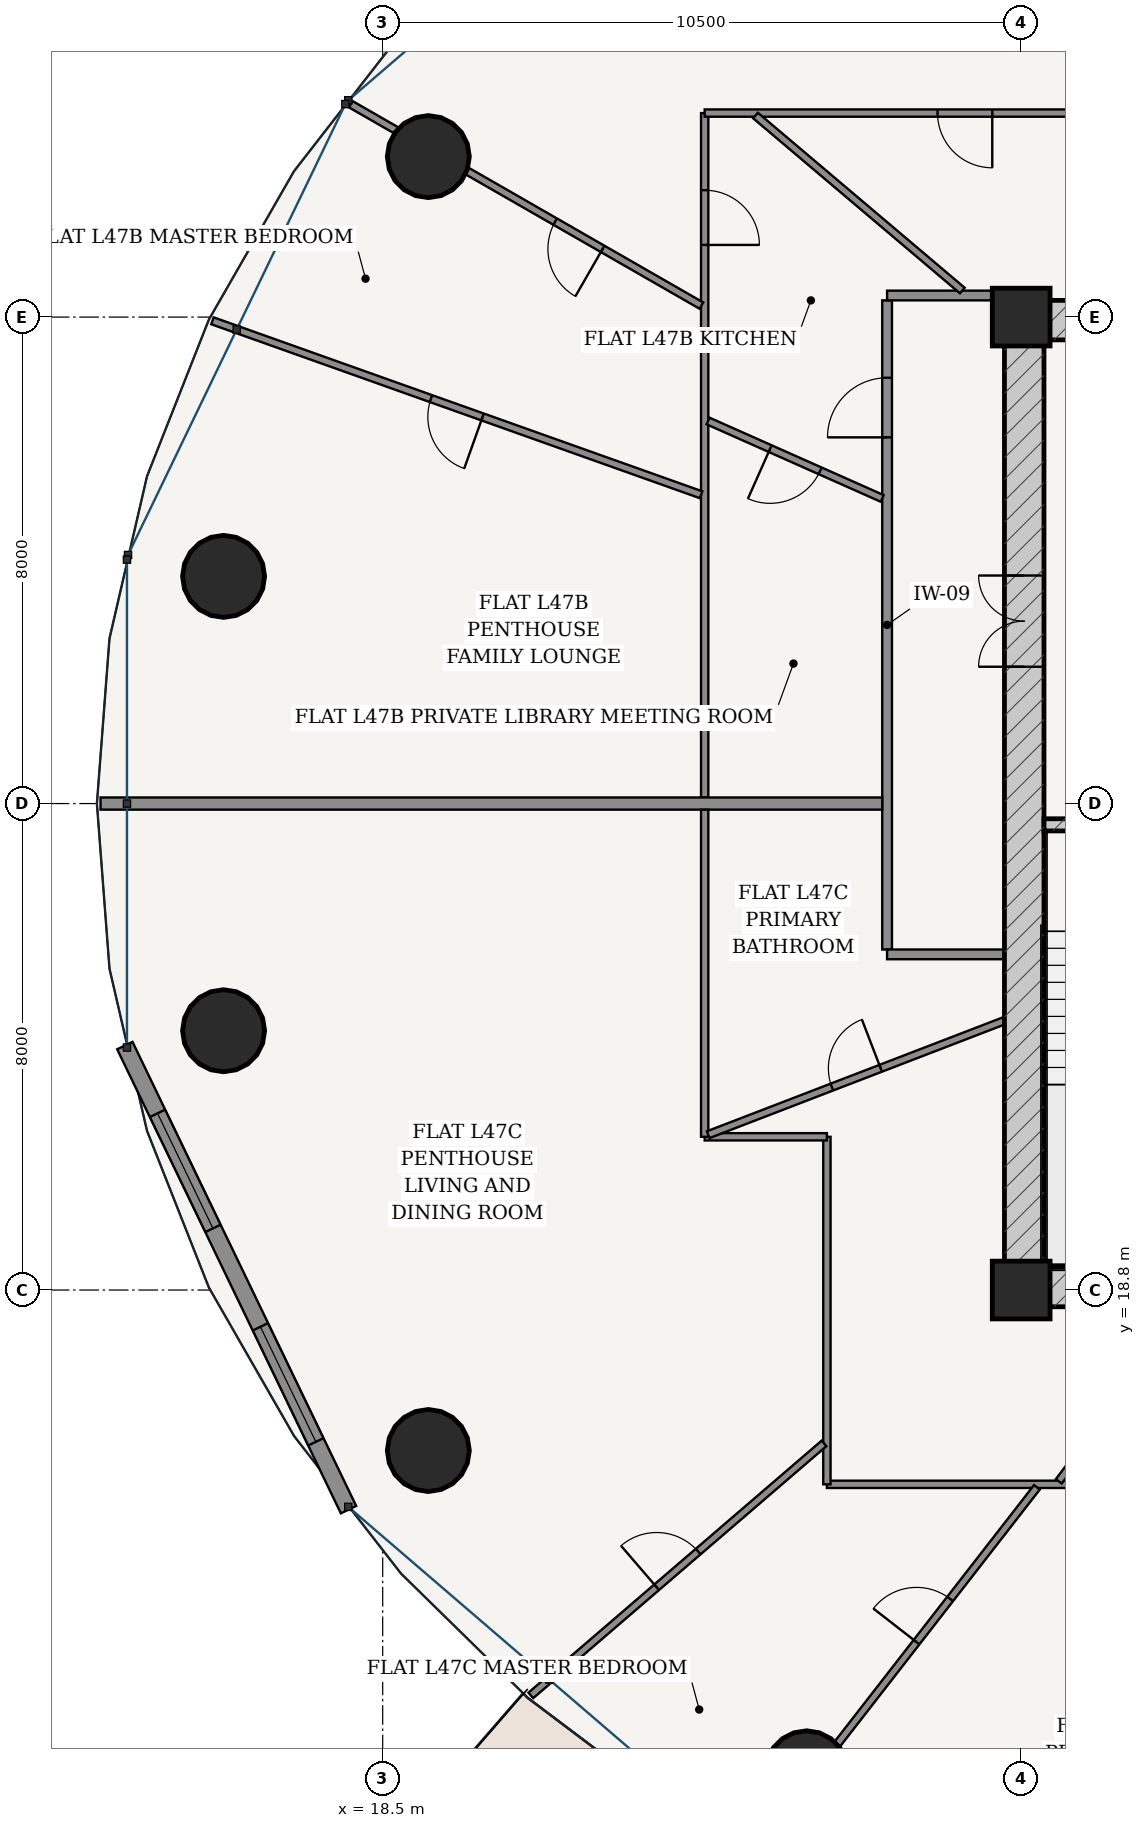
"""IFC4 building model, lengths in metres.
Left out: names, types, materials, properties, quantities, classifications, styles, units other than length and angle.
Written with IfcOpenShell. Run it as: python <this file> out.ifc"""

import sys

from ifc_helpers import new_model, si_unit, direction, frame, frame_2d, origin, origin_2d, place, context, subcontext, project, spatial, rectangle, hollow_circle, extrude, source, transform, mapped, element, fill, save


model = new_model("IFC4")
c1 = context("Model", 3, precision=1e-05, world=origin(), true_north=direction((-0.2419218956, 0.970295726276)))
c2 = subcontext(c1, "Body", "Model", "MODEL_VIEW")
j1 = project(units=[si_unit("LENGTHUNIT", "METRE"), si_unit("PLANEANGLEUNIT", "RADIAN")], contexts=[c1])
p1 = place(None, origin())
s1 = spatial("IfcSite", under=j1, at=p1, CompositionType="ELEMENT")
p2 = place(p1, origin())
s2 = spatial("IfcBuilding", under=s1, at=p2, CompositionType="ELEMENT")
p3 = place(p2, frame((0.0, 0.0, 178.6)))
s3 = spatial("IfcBuildingStorey", under=s2, at=p3, CompositionType="ELEMENT", Elevation=178.6)
for number, where, z_axis, x_axis in (
    (1, (29.0, 18.8, 0.0), (0.0, 0.0, 1.0), (1.0, 0.0, 0.0)),
    (2, (29.0, 34.8, 0.0), (0.0, 0.0, 1.0), (1.0, 0.0, 0.0)),
):
    element("IfcColumn", number, at=place(p3, frame(where, z_axis=z_axis, x_axis=x_axis)), inside=s3, PredefinedType="COLUMN", context=c2, shape_type="SweptSolid", body=[
        extrude(rectangle(XDim=0.95, YDim=0.95, at=origin_2d()), origin(), (0.0, 0.0, 1.0), 3.6),
    ])
p4 = place(p3, frame((28.725, 18.85, 0.0), z_axis=(0.0, 0.0, 1.0), x_axis=(1.0, 0.0, 0.0)))
e3 = element("IfcWall", 3, at=p4, inside=s3, PredefinedType="SHEAR", context=c2, shape_type="SweptSolid", body=[
    extrude(rectangle(XDim=18.55, YDim=0.65, at=frame_2d((9.275, 0.0))), origin(), (0.0, 0.0, 1.0), 3.33),
])
p5 = place(p4, frame((7.51, 0.0, 0.0)))
e4 = element("IfcOpeningElement", 4, at=p5, cuts=e3, PredefinedType="OPENING", context=c2, shape_type="SweptSolid", body=[
    extrude(rectangle(XDim=0.85, YDim=2.1, at=frame_2d((0.425, 1.05))), frame((0.0, 0.335, 0.0), z_axis=(0.0, -1.0, 0.0), x_axis=(1.0, 0.0, 0.0)), (0.0, 0.0, 1.0), 0.67),
])
p6 = place(p4, frame((10.59, 0.0, 0.0)))
e5 = element("IfcOpeningElement", 5, at=p6, cuts=e3, PredefinedType="OPENING", context=c2, shape_type="SweptSolid", body=[
    extrude(rectangle(XDim=0.85, YDim=2.1, at=frame_2d((0.425, 1.05))), frame((0.0, 0.335, 0.0), z_axis=(0.0, -1.0, 0.0), x_axis=(1.0, 0.0, 0.0)), (0.0, 0.0, 1.0), 0.67),
])
p7 = place(p3, frame((28.725, 34.75, 0.0), z_axis=(0.0, 0.0, 1.0), x_axis=(1.0, 0.0, 0.0)))
e6 = element("IfcWall", 6, at=p7, inside=s3, PredefinedType="SHEAR", context=c2, shape_type="SweptSolid", body=[
    extrude(rectangle(XDim=18.55, YDim=0.65, at=frame_2d((9.275, 0.0))), origin(), (0.0, 0.0, 1.0), 3.33),
])
p8 = place(p3, frame((29.05, 19.175, 0.0), z_axis=(0.0, 0.0, 1.0), x_axis=(0.0, 1.0, 0.0)))
e7 = element("IfcWall", 7, at=p8, inside=s3, PredefinedType="SHEAR", context=c2, shape_type="SweptSolid", body=[
    extrude(rectangle(XDim=15.25, YDim=0.65, at=frame_2d((7.625, 0.0))), origin(), (0.0, 0.0, 1.0), 3.33),
])
p9 = place(p8, frame((9.875, 0.0, 0.0)))
e8 = element("IfcOpeningElement", 8, at=p9, cuts=e7, PredefinedType="OPENING", context=c2, shape_type="SweptSolid", body=[
    extrude(rectangle(XDim=1.5, YDim=2.2, at=frame_2d((0.75, 1.1))), frame((0.0, 0.335, 0.0), z_axis=(0.0, -1.0, 0.0), x_axis=(1.0, 0.0, 0.0)), (0.0, 0.0, 1.0), 0.67),
])
p10 = place(p3, frame((29.375, 26.45, 0.0), z_axis=(0.0, 0.0, 1.0), x_axis=(1.0, 0.0, 0.0)))
e9 = element("IfcWall", 9, at=p10, inside=s3, PredefinedType="SOLIDWALL", context=c2, shape_type="SweptSolid", body=[
    extrude(rectangle(XDim=3.32, YDim=0.2, at=frame_2d((1.66, 0.0))), origin(), (0.0, 0.0, 1.0), 3.33),
])
p11 = place(p10, frame((1.185, 0.0, 0.0)))
e10 = element("IfcOpeningElement", 10, at=p11, cuts=e9, PredefinedType="OPENING", context=c2, shape_type="SweptSolid", body=[
    extrude(rectangle(XDim=0.95, YDim=2.15, at=frame_2d((0.475, 1.075))), frame((0.0, 0.11, 0.0), z_axis=(0.0, -1.0, 0.0), x_axis=(1.0, 0.0, 0.0)), (0.0, 0.0, 1.0), 0.22),
])
for number, where, z_axis, x_axis in (
    (11, (19.25, 37.439, 0.0), (0.0, 0.0, 1.0), (1.0, 0.0, 0.0)),
    (12, (15.883, 30.536, 0.0), (0.0, 0.0, 1.0), (1.0, 0.0, 0.0)),
    (13, (15.883, 23.064, 0.0), (0.0, 0.0, 1.0), (1.0, 0.0, 0.0)),
    (14, (19.25, 16.161, 0.0), (0.0, 0.0, 1.0), (1.0, 0.0, 0.0)),
    (15, (25.472, 10.877, 0.0), (0.0, 0.0, 1.0), (1.0, 0.0, 0.0)),
):
    element("IfcColumn", number, at=place(p3, frame(where, z_axis=z_axis, x_axis=x_axis)), inside=s3, PredefinedType="COLUMN", context=c2, shape_type="SweptSolid", body=[
        extrude(hollow_circle(Radius=0.675, WallThickness=0.042, at=origin_2d()), origin(), (0.0, 0.0, 1.0), 3.6),
    ])
p12 = place(p3, frame((14.26, 22.82, 0.0), z_axis=(0.0, 0.0, 1.0), x_axis=(0.434209827226, -0.900811759437, 0.0)))
e16 = element("IfcWall", 16, at=p12, inside=s3, PredefinedType="SOLIDWALL", context=c2, shape_type="SweptSolid", body=[
    extrude(rectangle(XDim=8.472, YDim=0.28, at=frame_2d((4.236, 0.0))), origin(), (0.0, 0.0, 1.0), 3.33),
])
p13 = place(p12, frame((1.237, 0.0, 0.85)))
e17 = element("IfcOpeningElement", 17, at=p13, cuts=e16, PredefinedType="OPENING", context=c2, shape_type="SweptSolid", body=[
    extrude(rectangle(XDim=2.1, YDim=1.95, at=frame_2d((1.05, 0.975))), frame((0.0, 0.15, 0.0), z_axis=(0.0, -1.0, 0.0), x_axis=(1.0, 0.0, 0.0)), (0.0, 0.0, 1.0), 0.3),
])
p14 = place(p12, frame((5.134, 0.0, 0.85)))
e18 = element("IfcOpeningElement", 18, at=p14, cuts=e16, PredefinedType="OPENING", context=c2, shape_type="SweptSolid", body=[
    extrude(rectangle(XDim=2.1, YDim=1.95, at=frame_2d((1.05, 0.975))), frame((0.0, 0.15, 0.0), z_axis=(0.0, -1.0, 0.0), x_axis=(1.0, 0.0, 0.0)), (0.0, 0.0, 1.0), 0.3),
])
p15 = place(p3, frame((26.795, 24.4, 0.0), z_axis=(0.0, 0.0, 1.0), x_axis=(0.0, 1.0, 0.0)))
e19 = element("IfcWall", 19, at=p15, inside=s3, PredefinedType="PARTITIONING", context=c2, shape_type="SweptSolid", body=[
    extrude(rectangle(XDim=10.675, YDim=0.16, at=frame_2d((5.337, 0.0))), origin(), (0.0, 0.0, 1.0), 2.776),
])
p16 = place(p15, frame((8.422, 0.0, 0.0)))
e20 = element("IfcOpeningElement", 20, at=p16, cuts=e19, PredefinedType="OPENING", context=c2, shape_type="SweptSolid", body=[
    extrude(rectangle(XDim=0.98, YDim=2.2, at=frame_2d((0.49, 1.1))), frame((0.0, 0.09, 0.0), z_axis=(0.0, -1.0, 0.0), x_axis=(1.0, 0.0, 0.0)), (0.0, 0.0, 1.0), 0.18),
])
p17 = place(p3, frame((26.795, 35.155, 0.0), z_axis=(0.0, 0.0, 1.0), x_axis=(1.0, 0.0, 0.0)))
e21 = element("IfcWall", 21, at=p17, inside=s3, PredefinedType="PARTITIONING", context=c2, shape_type="SweptSolid", body=[
    extrude(rectangle(XDim=1.93, YDim=0.16, at=frame_2d((0.965, 0.0))), origin(), (0.0, 0.0, 1.0), 2.776),
])
p18 = place(p3, frame((26.795, 24.32, 0.0), z_axis=(0.0, 0.0, 1.0), x_axis=(1.0, 0.0, 0.0)))
e22 = element("IfcWall", 22, at=p18, inside=s3, PredefinedType="PARTITIONING", context=c2, shape_type="SweptSolid", body=[
    extrude(rectangle(XDim=1.93, YDim=0.16, at=frame_2d((0.965, 0.0))), origin(), (0.0, 0.0, 1.0), 3.33),
])
p19 = place(p3, frame((23.795, 26.902, 0.0), z_axis=(0.0, 0.0, 1.0), x_axis=(0.0, 1.0, 0.0)))
e23 = element("IfcWall", 23, at=p19, inside=s3, PredefinedType="PARTITIONING", context=c2, shape_type="SweptSolid", body=[
    extrude(rectangle(XDim=11.253, YDim=0.12, at=frame_2d((5.626, 0.0))), origin(), (0.0, 0.0, 1.0), 2.776),
])
p20 = place(p19, frame((9.085, 0.0, 0.0)))
e24 = element("IfcOpeningElement", 24, at=p20, cuts=e23, PredefinedType="OPENING", context=c2, shape_type="SweptSolid", body=[
    extrude(rectangle(XDim=0.9, YDim=2.15, at=frame_2d((0.45, 1.075))), frame((0.0, 0.07, 0.0), z_axis=(0.0, -1.0, 0.0), x_axis=(1.0, 0.0, 0.0)), (0.0, 0.0, 1.0), 0.14),
])
p21 = place(p3, frame((23.795, 38.155, 0.0), z_axis=(0.0, 0.0, 1.0), x_axis=(1.0, 0.0, 0.0)))
e25 = element("IfcWall", 25, at=p21, inside=s3, PredefinedType="PARTITIONING", context=c2, shape_type="SweptSolid", body=[
    extrude(rectangle(XDim=8.01, YDim=0.12, at=frame_2d((4.005, 0.0))), origin(), (0.0, 0.0, 1.0), 2.776),
])
p22 = place(p21, frame((3.83, 0.0, 0.0)))
e26 = element("IfcOpeningElement", 26, at=p22, cuts=e25, PredefinedType="OPENING", context=c2, shape_type="SweptSolid", body=[
    extrude(rectangle(XDim=0.9, YDim=2.15, at=frame_2d((0.45, 1.075))), frame((0.0, 0.07, 0.0), z_axis=(0.0, -1.0, 0.0), x_axis=(1.0, 0.0, 0.0)), (0.0, 0.0, 1.0), 0.14),
])
p23 = place(p3, frame((23.741, 34.989, 0.0), z_axis=(0.0, 0.0, 1.0), x_axis=(-0.867167953258, 0.498015803808, 0.0)))
e27 = element("IfcWall", 27, at=p23, inside=s3, PredefinedType="PARTITIONING", context=c2, shape_type="SweptSolid", body=[
    extrude(rectangle(XDim=6.65, YDim=0.12, at=frame_2d((3.325, 0.0))), origin(), (0.0, 0.0, 1.0), 2.776),
])
p24 = place(p23, frame((1.873, 0.0, 0.0)))
e28 = element("IfcOpeningElement", 28, at=p24, cuts=e27, PredefinedType="OPENING", context=c2, shape_type="SweptSolid", body=[
    extrude(rectangle(XDim=0.9, YDim=2.15, at=frame_2d((0.45, 1.075))), frame((0.0, 0.07, 0.0), z_axis=(0.0, -1.0, 0.0), x_axis=(1.0, 0.0, 0.0)), (0.0, 0.0, 1.0), 0.14),
])
p25 = place(p3, frame((23.737, 31.878, 0.0), z_axis=(0.0, 0.0, 1.0), x_axis=(-0.942071057968, 0.335413359512, 0.0)))
e29 = element("IfcWall", 29, at=p25, inside=s3, PredefinedType="PARTITIONING", context=c2, shape_type="SweptSolid", body=[
    extrude(rectangle(XDim=8.53, YDim=0.12, at=frame_2d((4.265, 0.0))), origin(), (0.0, 0.0, 1.0), 2.846),
])
p26 = place(p25, frame((3.815, 0.0, 0.0)))
e30 = element("IfcOpeningElement", 30, at=p26, cuts=e29, PredefinedType="OPENING", context=c2, shape_type="SweptSolid", body=[
    extrude(rectangle(XDim=0.9, YDim=2.15, at=frame_2d((0.45, 1.075))), frame((0.0, 0.07, 0.0), z_axis=(0.0, -1.0, 0.0), x_axis=(1.0, 0.0, 0.0)), (0.0, 0.0, 1.0), 0.14),
])
p27 = place(p3, frame((28.032, 35.236, 0.0), z_axis=(0.0, 0.0, 1.0), x_axis=(-0.763321857138, 0.646018376221, 0.0)))
e31 = element("IfcWall", 31, at=p27, inside=s3, PredefinedType="PARTITIONING", context=c2, shape_type="SweptSolid", body=[
    extrude(rectangle(XDim=4.456, YDim=0.12, at=frame_2d((2.228, 0.0))), origin(), (0.0, 0.0, 1.0), 3.005),
])
p28 = place(p3, frame((26.715, 31.818, 0.0), z_axis=(0.0, 0.0, 1.0), x_axis=(-0.913750499147, 0.406275799561, 0.0)))
e32 = element("IfcWall", 32, at=p28, inside=s3, PredefinedType="PARTITIONING", context=c2, shape_type="SweptSolid", body=[
    extrude(rectangle(XDim=3.134, YDim=0.12, at=frame_2d((1.567, 0.0))), origin(), (0.0, 0.0, 1.0), 3.33),
])
p29 = place(p28, frame((1.117, 0.0, 0.0)))
e33 = element("IfcOpeningElement", 33, at=p29, cuts=e32, PredefinedType="OPENING", context=c2, shape_type="SweptSolid", body=[
    extrude(rectangle(XDim=0.9, YDim=2.15, at=frame_2d((0.45, 1.075))), frame((0.0, 0.07, 0.0), z_axis=(0.0, -1.0, 0.0), x_axis=(1.0, 0.0, 0.0)), (0.0, 0.0, 1.0), 0.14),
])
p30 = place(p3, frame((26.715, 26.8, 0.0), z_axis=(0.0, 0.0, 1.0), x_axis=(-1.0, 0.0, 0.0)))
e34 = element("IfcWall", 34, at=p30, inside=s3, PredefinedType="PARTITIONING", context=c2, shape_type="SweptSolid", body=[
    extrude(rectangle(XDim=12.855, YDim=0.2, at=frame_2d((6.427, 0.0))), origin(), (0.0, 0.0, 1.0), 2.846),
])
p31 = place(p3, frame((31.32, 15.605, 0.0), z_axis=(0.0, 0.0, 1.0), x_axis=(-1.0, 0.0, 0.0)))
e35 = element("IfcWall", 35, at=p31, inside=s3, PredefinedType="PARTITIONING", context=c2, shape_type="SweptSolid", body=[
    extrude(rectangle(XDim=5.515, YDim=0.12, at=frame_2d((2.758, 0.0))), origin(), (0.0, 0.0, 1.0), 2.776),
])
p32 = place(p3, frame((25.805, 15.605, 0.0), z_axis=(0.0, 0.0, 1.0), x_axis=(0.0, 1.0, 0.0)))
e36 = element("IfcWall", 36, at=p32, inside=s3, PredefinedType="PARTITIONING", context=c2, shape_type="SweptSolid", body=[
    extrude(rectangle(XDim=5.715, YDim=0.12, at=frame_2d((2.857, 0.0))), origin(), (0.0, 0.0, 1.0), 2.776),
])
p33 = place(p3, frame((25.805, 21.32, 0.0), z_axis=(0.0, 0.0, 1.0), x_axis=(-1.0, 0.0, 0.0)))
e37 = element("IfcWall", 37, at=p33, inside=s3, PredefinedType="PARTITIONING", context=c2, shape_type="SweptSolid", body=[
    extrude(rectangle(XDim=2.01, YDim=0.12, at=frame_2d((1.005, 0.0))), origin(), (0.0, 0.0, 1.0), 3.33),
])
p34 = place(p3, frame((23.795, 21.32, 0.0), z_axis=(0.0, 0.0, 1.0), x_axis=(0.0, 1.0, 0.0)))
e38 = element("IfcWall", 38, at=p34, inside=s3, PredefinedType="PARTITIONING", context=c2, shape_type="SweptSolid", body=[
    extrude(rectangle(XDim=5.378, YDim=0.12, at=frame_2d((2.689, 0.0))), origin(), (0.0, 0.0, 1.0), 2.776),
])
p35 = place(p3, frame((25.758, 16.278, 0.0), z_axis=(0.0, 0.0, 1.0), x_axis=(-0.758374994665, -0.651818508073, 0.0)))
e39 = element("IfcWall", 39, at=p35, inside=s3, PredefinedType="PARTITIONING", context=c2, shape_type="SweptSolid", body=[
    extrude(rectangle(XDim=6.358, YDim=0.12, at=frame_2d((3.179, 0.0))), origin(), (0.0, 0.0, 1.0), 2.846),
])
p36 = place(p35, frame((2.729, 0.0, 0.0)))
e40 = element("IfcOpeningElement", 40, at=p36, cuts=e39, PredefinedType="OPENING", context=c2, shape_type="SweptSolid", body=[
    extrude(rectangle(XDim=0.9, YDim=2.15, at=frame_2d((0.45, 1.075))), frame((0.0, 0.07, 0.0), z_axis=(0.0, -1.0, 0.0), x_axis=(1.0, 0.0, 0.0)), (0.0, 0.0, 1.0), 0.14),
])
p37 = place(p3, frame((29.259, 15.556, 0.0), z_axis=(0.0, 0.0, 1.0), x_axis=(-0.61375493029, -0.789496602617, 0.0)))
e41 = element("IfcWall", 41, at=p37, inside=s3, PredefinedType="PARTITIONING", context=c2, shape_type="SweptSolid", body=[
    extrude(rectangle(XDim=7.556, YDim=0.12, at=frame_2d((3.778, 0.0))), origin(), (0.0, 0.0, 1.0), 2.776),
])
p38 = place(p37, frame((2.325, 0.0, 0.0)))
e42 = element("IfcOpeningElement", 42, at=p38, cuts=e41, PredefinedType="OPENING", context=c2, shape_type="SweptSolid", body=[
    extrude(rectangle(XDim=0.9, YDim=2.15, at=frame_2d((0.45, 1.075))), frame((0.0, 0.07, 0.0), z_axis=(0.0, -1.0, 0.0), x_axis=(1.0, 0.0, 0.0)), (0.0, 0.0, 1.0), 0.14),
])
p39 = place(p3, frame((28.723, 23.229, 0.0), z_axis=(0.0, 0.0, 1.0), x_axis=(-0.933262385607, -0.359195378048, 0.0)))
e43 = element("IfcWall", 43, at=p39, inside=s3, PredefinedType="PARTITIONING", context=c2, shape_type="SweptSolid", body=[
    extrude(rectangle(XDim=5.219, YDim=0.12, at=frame_2d((2.609, 0.0))), origin(), (0.0, 0.0, 1.0), 3.33),
])
p40 = place(p39, frame((2.179, 0.0, 0.0)))
e44 = element("IfcOpeningElement", 44, at=p40, cuts=e43, PredefinedType="OPENING", context=c2, shape_type="SweptSolid", body=[
    extrude(rectangle(XDim=0.86, YDim=2.15, at=frame_2d((0.43, 1.075))), frame((0.0, 0.07, 0.0), z_axis=(0.0, -1.0, 0.0), x_axis=(1.0, 0.0, 0.0)), (0.0, 0.0, 1.0), 0.14),
])
p41 = place(p3, frame((31.777, 18.525, 0.0), z_axis=(0.0, 0.0, 1.0), x_axis=(-0.601054484551, -0.799208049635, 0.0)))
e45 = element("IfcWall", 45, at=p41, inside=s3, PredefinedType="PARTITIONING", context=c2, shape_type="SweptSolid", body=[
    extrude(rectangle(XDim=3.592, YDim=0.12, at=frame_2d((1.796, 0.0))), origin(), (0.0, 0.0, 1.0), 3.33),
])
p42 = place(p41, frame((1.346, 0.0, 0.0)))
e46 = element("IfcOpeningElement", 46, at=p42, cuts=e45, PredefinedType="OPENING", context=c2, shape_type="SweptSolid", body=[
    extrude(rectangle(XDim=0.9, YDim=2.15, at=frame_2d((0.45, 1.075))), frame((0.0, 0.07, 0.0), z_axis=(0.0, -1.0, 0.0), x_axis=(1.0, 0.0, 0.0)), (0.0, 0.0, 1.0), 0.14),
])
m1 = source(origin(), c2, "Body", "SweptSolid", [
    extrude(rectangle(XDim=2.1, YDim=1.95, at=frame_2d((1.05, 0.975))), frame((0.0, 0.03, 0.0), z_axis=(0.0, -1.0, 0.0), x_axis=(1.0, 0.0, 0.0)), (0.0, 0.0, 1.0), 0.06),
])
p43 = place(p13, origin())
e47 = element("IfcWindow", 47, at=p43, inside=s3, PartitioningType="SINGLE_PANEL", PredefinedType="WINDOW", context=c2, shape_type="MappedRepresentation", body=[
    mapped(m1, transform((0.0, 0.0, 0.0), scale=1.0)),
])
fill(e17, e47)
p44 = place(p14, origin())
e48 = element("IfcWindow", 48, at=p44, inside=s3, PartitioningType="SINGLE_PANEL", PredefinedType="WINDOW", context=c2, shape_type="MappedRepresentation", body=[
    mapped(m1, transform((0.0, 0.0, 0.0), scale=1.0)),
])
fill(e18, e48)
m2 = source(origin(), c2, "Body", "SweptSolid", [
    extrude(rectangle(XDim=1.5, YDim=2.2, at=frame_2d((0.75, 1.1))), frame((0.0, 0.025, 0.0), z_axis=(0.0, -1.0, 0.0), x_axis=(1.0, 0.0, 0.0)), (0.0, 0.0, 1.0), 0.05),
])
p45 = place(p9, origin())
e49 = element("IfcDoor", 49, at=p45, inside=s3, OperationType="DOUBLE_DOOR_SINGLE_SWING", PredefinedType="DOOR", context=c2, shape_type="MappedRepresentation", body=[
    mapped(m2, transform((0.0, 0.0, 0.0), scale=1.0)),
])
fill(e8, e49)
m3 = source(origin(), c2, "Body", "SweptSolid", [
    extrude(rectangle(XDim=0.98, YDim=2.2, at=frame_2d((0.49, 1.1))), frame((0.0, 0.025, 0.0), z_axis=(0.0, -1.0, 0.0), x_axis=(1.0, 0.0, 0.0)), (0.0, 0.0, 1.0), 0.05),
])
p46 = place(p16, origin())
e50 = element("IfcDoor", 50, at=p46, inside=s3, OperationType="SINGLE_SWING_LEFT", PredefinedType="DOOR", context=c2, shape_type="MappedRepresentation", body=[
    mapped(m3, transform((0.0, 0.0, 0.0), scale=1.0)),
])
fill(e20, e50)
m4 = source(origin(), c2, "Body", "SweptSolid", [
    extrude(rectangle(XDim=0.9, YDim=2.15, at=frame_2d((0.45, 1.075))), frame((0.0, 0.025, 0.0), z_axis=(0.0, -1.0, 0.0), x_axis=(1.0, 0.0, 0.0)), (0.0, 0.0, 1.0), 0.05),
])
p47 = place(p20, frame((0.9, 0.0, 0.0), z_axis=(0.0, 0.0, 1.0), x_axis=(-1.0, 0.0, 0.0)))
e51 = element("IfcDoor", 51, at=p47, inside=s3, OperationType="SINGLE_SWING_RIGHT", PredefinedType="DOOR", context=c2, shape_type="MappedRepresentation", body=[
    mapped(m4, transform((0.0, 0.0, 0.0), scale=1.0)),
])
fill(e24, e51)
p48 = place(p22, frame((0.9, 0.0, 0.0), z_axis=(0.0, 0.0, 1.0), x_axis=(-1.0, 0.0, 0.0)))
e52 = element("IfcDoor", 52, at=p48, inside=s3, OperationType="SINGLE_SWING_LEFT", PredefinedType="DOOR", context=c2, shape_type="MappedRepresentation", body=[
    mapped(m4, transform((0.0, 0.0, 0.0), scale=1.0)),
])
fill(e26, e52)
p49 = place(p29, origin())
e53 = element("IfcDoor", 53, at=p49, inside=s3, OperationType="SINGLE_SWING_RIGHT", PredefinedType="DOOR", context=c2, shape_type="MappedRepresentation", body=[
    mapped(m4, transform((0.0, 0.0, 0.0), scale=1.0)),
])
fill(e33, e53)
p50 = place(p24, origin())
e54 = element("IfcDoor", 54, at=p50, inside=s3, OperationType="SINGLE_SWING_LEFT", PredefinedType="DOOR", context=c2, shape_type="MappedRepresentation", body=[
    mapped(m4, transform((0.0, 0.0, 0.0), scale=1.0)),
])
fill(e28, e54)
p51 = place(p26, origin())
e55 = element("IfcDoor", 55, at=p51, inside=s3, OperationType="SINGLE_SWING_LEFT", PredefinedType="DOOR", context=c2, shape_type="MappedRepresentation", body=[
    mapped(m4, transform((0.0, 0.0, 0.0), scale=1.0)),
])
fill(e30, e55)
p52 = place(p38, frame((0.9, 0.0, 0.0), z_axis=(0.0, 0.0, 1.0), x_axis=(-1.0, 0.0, 0.0)))
e56 = element("IfcDoor", 56, at=p52, inside=s3, OperationType="SINGLE_SWING_LEFT", PredefinedType="DOOR", context=c2, shape_type="MappedRepresentation", body=[
    mapped(m4, transform((0.0, 0.0, 0.0), scale=1.0)),
])
fill(e42, e56)
m5 = source(origin(), c2, "Body", "SweptSolid", [
    extrude(rectangle(XDim=0.86, YDim=2.15, at=frame_2d((0.43, 1.075))), frame((0.0, 0.025, 0.0), z_axis=(0.0, -1.0, 0.0), x_axis=(1.0, 0.0, 0.0)), (0.0, 0.0, 1.0), 0.05),
])
p53 = place(p40, frame((0.86, 0.0, 0.0), z_axis=(0.0, 0.0, 1.0), x_axis=(-1.0, 0.0, 0.0)))
e57 = element("IfcDoor", 57, at=p53, inside=s3, OperationType="SINGLE_SWING_RIGHT", PredefinedType="DOOR", context=c2, shape_type="MappedRepresentation", body=[
    mapped(m5, transform((0.0, 0.0, 0.0), scale=1.0)),
])
fill(e44, e57)
p54 = place(p36, frame((0.9, 0.0, 0.0), z_axis=(0.0, 0.0, 1.0), x_axis=(-1.0, 0.0, 0.0)))
e58 = element("IfcDoor", 58, at=p54, inside=s3, OperationType="SINGLE_SWING_LEFT", PredefinedType="DOOR", context=c2, shape_type="MappedRepresentation", body=[
    mapped(m4, transform((0.0, 0.0, 0.0), scale=1.0)),
])
fill(e40, e58)
save(model, sys.argv[1])
